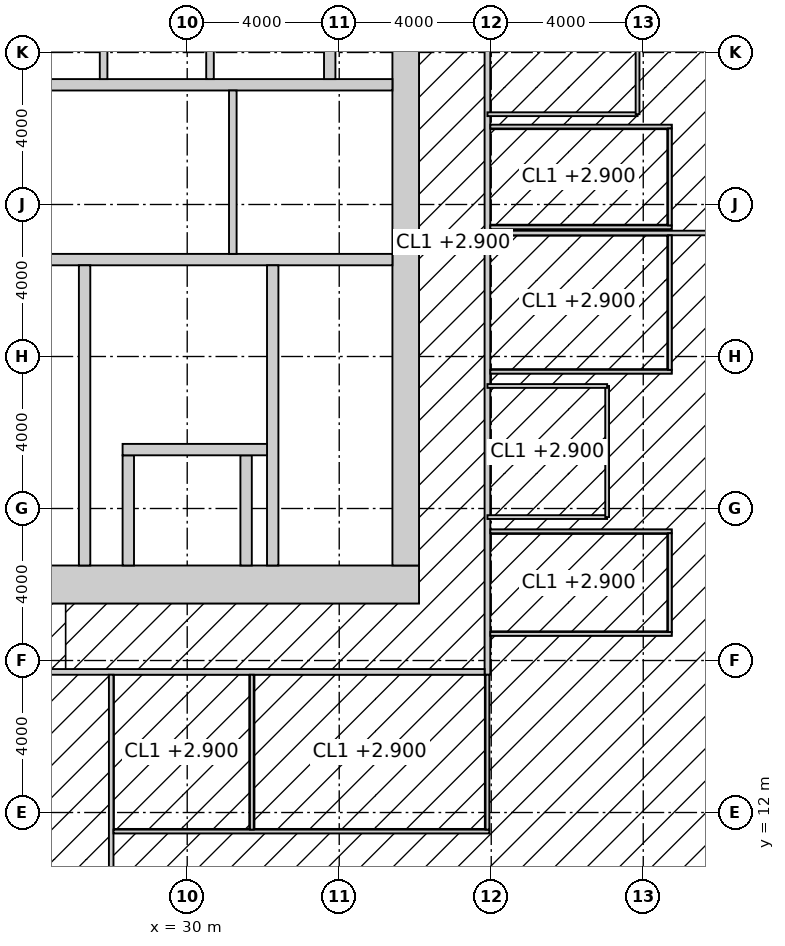
"""IFC4 building model, lengths in metres.
Left out: names, types, materials, properties, quantities, classifications, styles, units other than length and angle.
Written with IfcOpenShell. Run it as: python <this file> out.ifc"""

import sys

from ifc_helpers import new_model, si_unit, direction, frame, frame_2d, origin, place, context, subcontext, project, spatial, rectangle, extrude, element, fill, save


model = new_model("IFC4")
c1 = context("Model", 3, precision=1e-05, world=origin(), true_north=direction((0.0, 1.0)))
c2 = subcontext(c1, "Body", "Model", "MODEL_VIEW")
j1 = project(units=[si_unit("LENGTHUNIT", "METRE"), si_unit("PLANEANGLEUNIT", "RADIAN")], contexts=[c1])
p1 = place(None, origin())
s1 = spatial("IfcSite", under=j1, at=p1, CompositionType="ELEMENT")
p2 = place(p1, origin())
s2 = spatial("IfcBuilding", under=s1, at=p2, CompositionType="ELEMENT")
p3 = place(p2, frame((0.0, 0.0, 121.4)))
s3 = spatial("IfcBuildingStorey", under=s2, at=p3, CompositionType="ELEMENT", Elevation=121.4)
p4 = place(p3, frame((18.5, 18.0, -0.15), z_axis=(0.0, 0.0, 1.0), x_axis=(1.0, 0.0, 0.0)))
e1 = element("IfcWall", 1, at=p4, inside=s3, PredefinedType="SHEAR", context=c2, shape_type="SweptSolid", body=[
    extrude(rectangle(XDim=17.6, YDim=1.0, at=frame_2d((8.8, 0.0))), origin(), (0.0, 0.0, 1.0), 4.0),
])
p5 = place(p4, frame((3.45, 0.0, 0.15)))
e2 = element("IfcOpeningElement", 2, at=p5, cuts=e1, PredefinedType="OPENING", context=c2, shape_type="SweptSolid", body=[
    extrude(rectangle(XDim=1.5, YDim=2.4, at=frame_2d((0.75, 1.2))), frame((0.0, 0.51, 0.0), z_axis=(0.0, -1.0, 0.0), x_axis=(1.0, 0.0, 0.0)), (0.0, 0.0, 1.0), 1.02),
])
p6 = place(p3, frame((35.75, 18.5, -0.15), z_axis=(0.0, 0.0, 1.0), x_axis=(0.0, 1.0, 0.0)))
e3 = element("IfcWall", 3, at=p6, inside=s3, PredefinedType="SHEAR", context=c2, shape_type="SweptSolid", body=[
    extrude(rectangle(XDim=17.0, YDim=0.7, at=frame_2d((8.5, 0.0))), origin(), (0.0, 0.0, 1.0), 4.0),
])
p7 = place(p6, frame((9.85, 0.0, 0.15)))
e4 = element("IfcOpeningElement", 4, at=p7, cuts=e3, PredefinedType="OPENING", context=c2, shape_type="SweptSolid", body=[
    extrude(rectangle(XDim=1.0, YDim=2.2, at=frame_2d((0.5, 1.1))), frame((0.0, 0.36, 0.0), z_axis=(0.0, -1.0, 0.0), x_axis=(1.0, 0.0, 0.0)), (0.0, 0.0, 1.0), 0.72),
])
p8 = place(p3, frame((24.15, 26.55, -0.15), z_axis=(0.0, 0.0, 1.0), x_axis=(1.0, 0.0, 0.0)))
e5 = element("IfcWall", 5, at=p8, inside=s3, PredefinedType="SHEAR", context=c2, shape_type="SweptSolid", body=[
    extrude(rectangle(XDim=11.25, YDim=0.3, at=frame_2d((5.625, 0.0))), origin(), (0.0, 0.0, 1.0), 4.0),
])
p9 = place(p8, frame((9.25, 0.0, 0.15)))
e6 = element("IfcOpeningElement", 6, at=p9, cuts=e5, PredefinedType="OPENING", context=c2, shape_type="SweptSolid", body=[
    extrude(rectangle(XDim=1.0, YDim=2.2, at=frame_2d((0.5, 1.1))), frame((0.0, 0.16, 0.0), z_axis=(0.0, -1.0, 0.0), x_axis=(1.0, 0.0, 0.0)), (0.0, 0.0, 1.0), 0.32),
])
p10 = place(p8, frame((4.9, 0.0, 0.15)))
e7 = element("IfcOpeningElement", 7, at=p10, cuts=e5, PredefinedType="OPENING", context=c2, shape_type="SweptSolid", body=[
    extrude(rectangle(XDim=1.5, YDim=2.4, at=frame_2d((0.75, 1.2))), frame((0.0, 0.16, 0.0), z_axis=(0.0, -1.0, 0.0), x_axis=(1.0, 0.0, 0.0)), (0.0, 0.0, 1.0), 0.32),
])
p11 = place(p3, frame((27.3, 18.5, -0.15), z_axis=(0.0, 0.0, 1.0), x_axis=(0.0, 1.0, 0.0)))
e8 = element("IfcWall", 8, at=p11, inside=s3, PredefinedType="SHEAR", context=c2, shape_type="SweptSolid", body=[
    extrude(rectangle(XDim=7.9, YDim=0.3, at=frame_2d((3.95, 0.0))), origin(), (0.0, 0.0, 1.0), 4.0),
])
p12 = place(p11, frame((6.4, 0.0, 0.15)))
e9 = element("IfcOpeningElement", 9, at=p12, cuts=e8, PredefinedType="OPENING", context=c2, shape_type="SweptSolid", body=[
    extrude(rectangle(XDim=1.0, YDim=2.2, at=frame_2d((0.5, 1.1))), frame((0.0, 0.16, 0.0), z_axis=(0.0, -1.0, 0.0), x_axis=(1.0, 0.0, 0.0)), (0.0, 0.0, 1.0), 0.32),
])
p13 = place(p3, frame((32.25, 18.5, -0.15), z_axis=(0.0, 0.0, 1.0), x_axis=(0.0, 1.0, 0.0)))
e10 = element("IfcWall", 10, at=p13, inside=s3, PredefinedType="SHEAR", context=c2, shape_type="SweptSolid", body=[
    extrude(rectangle(XDim=7.9, YDim=0.3, at=frame_2d((3.95, 0.0))), origin(), (0.0, 0.0, 1.0), 4.0),
])
for number, where, z_axis, x_axis in (
    (11, (28.45, 18.5, -0.15), (0.0, 0.0, 1.0), (0.0, 1.0, 0.0)),
    (12, (31.55, 18.5, -0.15), (0.0, 0.0, 1.0), (0.0, 1.0, 0.0)),
):
    element("IfcWall", number, at=place(p3, frame(where, z_axis=z_axis, x_axis=x_axis)), inside=s3, PredefinedType="SHEAR", context=c2, shape_type="SweptSolid", body=[
        extrude(rectangle(XDim=2.9, YDim=0.3, at=frame_2d((1.45, 0.0))), origin(), (0.0, 0.0, 1.0), 4.0),
    ])
p14 = place(p3, frame((28.3, 21.55, -0.15), z_axis=(0.0, 0.0, 1.0), x_axis=(1.0, 0.0, 0.0)))
e13 = element("IfcWall", 13, at=p14, inside=s3, PredefinedType="SHEAR", context=c2, shape_type="SweptSolid", body=[
    extrude(rectangle(XDim=3.8, YDim=0.3, at=frame_2d((1.9, 0.0))), origin(), (0.0, 0.0, 1.0), 4.0),
])
p15 = place(p14, frame((1.05, 0.0, 0.15)))
e14 = element("IfcOpeningElement", 14, at=p15, cuts=e13, PredefinedType="OPENING", context=c2, shape_type="SweptSolid", body=[
    extrude(rectangle(XDim=1.3, YDim=2.4, at=frame_2d((0.65, 1.2))), frame((0.0, 0.16, 0.0), z_axis=(0.0, -1.0, 0.0), x_axis=(1.0, 0.0, 0.0)), (0.0, 0.0, 1.0), 0.32),
])
p16 = place(p3, frame((24.15, 31.15, -0.15), z_axis=(0.0, 0.0, 1.0), x_axis=(1.0, 0.0, 0.0)))
e15 = element("IfcWall", 15, at=p16, inside=s3, PredefinedType="SHEAR", context=c2, shape_type="SweptSolid", body=[
    extrude(rectangle(XDim=11.25, YDim=0.3, at=frame_2d((5.625, 0.0))), origin(), (0.0, 0.0, 1.0), 4.0),
])
p17 = place(p16, frame((7.25, 0.0, 0.15)))
e16 = element("IfcOpeningElement", 16, at=p17, cuts=e15, PredefinedType="OPENING", context=c2, shape_type="SweptSolid", body=[
    extrude(rectangle(XDim=1.4, YDim=2.4, at=frame_2d((0.7, 1.2))), frame((0.0, 0.16, 0.0), z_axis=(0.0, -1.0, 0.0), x_axis=(1.0, 0.0, 0.0)), (0.0, 0.0, 1.0), 0.32),
])
p18 = place(p3, frame((33.75, 31.3, -0.15), z_axis=(0.0, 0.0, 1.0), x_axis=(0.0, 1.0, 0.0)))
e17 = element("IfcWall", 17, at=p18, inside=s3, PredefinedType="SHEAR", context=c2, shape_type="SweptSolid", body=[
    extrude(rectangle(XDim=4.2, YDim=0.3, at=frame_2d((2.1, 0.0))), origin(), (0.0, 0.0, 1.0), 4.0),
])
for number, where, z_axis, x_axis in (
    (18, (27.8, 31.3, -0.15), (0.0, 0.0, 1.0), (0.0, 1.0, 0.0)),
    (19, (30.6, 31.3, -0.15), (0.0, 0.0, 1.0), (0.0, 1.0, 0.0)),
):
    element("IfcWall", number, at=place(p3, frame(where, z_axis=z_axis, x_axis=x_axis)), inside=s3, PredefinedType="SOLIDWALL", context=c2, shape_type="SweptSolid", body=[
        extrude(rectangle(XDim=2.8, YDim=0.2, at=frame_2d((1.4, 0.0))), origin(), (0.0, 0.0, 1.0), 4.0),
    ])
p19 = place(p3, frame((31.2, 26.7, 0.0), z_axis=(0.0, 0.0, 1.0), x_axis=(0.0, 1.0, 0.0)))
e20 = element("IfcWall", 20, at=p19, inside=s3, PredefinedType="SOLIDWALL", context=c2, shape_type="SweptSolid", body=[
    extrude(rectangle(XDim=4.3, YDim=0.2, at=frame_2d((2.15, 0.0))), origin(), (0.0, 0.0, 1.0), 3.85),
])
p20 = place(p3, frame((37.9, 15.625, 0.0), z_axis=(0.0, 0.0, 1.0), x_axis=(0.0, 1.0, 0.0)))
e21 = element("IfcWall", 21, at=p20, inside=s3, PredefinedType="PARTITIONING", context=c2, shape_type="SweptSolid", body=[
    extrude(rectangle(XDim=22.75, YDim=0.15, at=frame_2d((11.375, 0.0))), origin(), (0.0, 0.0, 1.0), 2.95),
])
p21 = place(p20, frame((4.974, 0.0, 0.0)))
e22 = element("IfcOpeningElement", 22, at=p21, cuts=e21, PredefinedType="OPENING", context=c2, shape_type="SweptSolid", body=[
    extrude(rectangle(XDim=1.8, YDim=2.4, at=frame_2d((0.9, 1.2))), frame((0.0, 0.085, 0.0), z_axis=(0.0, -1.0, 0.0), x_axis=(1.0, 0.0, 0.0)), (0.0, 0.0, 1.0), 0.17),
])
p22 = place(p20, frame((16.226, 0.0, 0.0)))
e23 = element("IfcOpeningElement", 23, at=p22, cuts=e21, PredefinedType="OPENING", context=c2, shape_type="SweptSolid", body=[
    extrude(rectangle(XDim=1.8, YDim=2.4, at=frame_2d((0.9, 1.2))), frame((0.0, 0.085, 0.0), z_axis=(0.0, -1.0, 0.0), x_axis=(1.0, 0.0, 0.0)), (0.0, 0.0, 1.0), 0.17),
])
p23 = place(p3, frame((15.775, 15.7, 0.0), z_axis=(0.0, 0.0, 1.0), x_axis=(1.0, 0.0, 0.0)))
e24 = element("IfcWall", 24, at=p23, inside=s3, PredefinedType="PARTITIONING", context=c2, shape_type="SweptSolid", body=[
    extrude(rectangle(XDim=22.05, YDim=0.15, at=frame_2d((11.025, 0.0))), origin(), (0.0, 0.0, 1.0), 3.85),
])
p24 = place(p3, frame((28.0, 4.3, 0.0), z_axis=(0.0, 0.0, 1.0), x_axis=(0.0, 1.0, 0.0)))
e25 = element("IfcWall", 25, at=p24, inside=s3, PredefinedType="PARTITIONING", context=c2, shape_type="SweptSolid", body=[
    extrude(rectangle(XDim=11.325, YDim=0.12, at=frame_2d((5.663, 0.0))), origin(), (0.0, 0.0, 1.0), 3.85),
])
p25 = place(p3, frame((37.975, 27.25, 0.0), z_axis=(0.0, 0.0, 1.0), x_axis=(1.0, 0.0, 0.0)))
e26 = element("IfcWall", 26, at=p25, inside=s3, PredefinedType="PARTITIONING", context=c2, shape_type="SweptSolid", body=[
    extrude(rectangle(XDim=19.725, YDim=0.12, at=frame_2d((9.862, 0.0))), origin(), (0.0, 0.0, 1.0), 3.85),
])
p26 = place(p3, frame((28.061, 11.5, 0.0), z_axis=(0.0, 0.0, 1.0), x_axis=(1.0, 0.0, 0.0)))
e27 = element("IfcWall", 27, at=p26, inside=s3, PredefinedType="PARTITIONING", context=c2, shape_type="SweptSolid", body=[
    extrude(rectangle(XDim=9.889, YDim=0.1, at=frame_2d((4.944, 0.0))), origin(), (0.0, 0.0, 1.0), 3.85),
])
p27 = place(p26, frame((1.29, 0.0, 0.0)))
e28 = element("IfcOpeningElement", 28, at=p27, cuts=e27, PredefinedType="OPENING", context=c2, shape_type="SweptSolid", body=[
    extrude(rectangle(XDim=1.0, YDim=2.2, at=frame_2d((0.5, 1.1))), frame((0.0, 0.06, 0.0), z_axis=(0.0, -1.0, 0.0), x_axis=(1.0, 0.0, 0.0)), (0.0, 0.0, 1.0), 0.12),
])
p28 = place(p26, frame((6.24, 0.0, 0.0)))
e29 = element("IfcOpeningElement", 29, at=p28, cuts=e27, PredefinedType="OPENING", context=c2, shape_type="SweptSolid", body=[
    extrude(rectangle(XDim=1.0, YDim=2.2, at=frame_2d((0.5, 1.1))), frame((0.0, 0.06, 0.0), z_axis=(0.0, -1.0, 0.0), x_axis=(1.0, 0.0, 0.0)), (0.0, 0.0, 1.0), 0.12),
])
for number, where, z_axis, x_axis in (
    (30, (37.975, 16.7, 0.0), (0.0, 0.0, 1.0), (1.0, 0.0, 0.0)),
    (31, (37.975, 19.399, 0.0), (0.0, 0.0, 1.0), (1.0, 0.0, 0.0)),
):
    element("IfcWall", number, at=place(p3, frame(where, z_axis=z_axis, x_axis=x_axis)), inside=s3, PredefinedType="PARTITIONING", context=c2, shape_type="SweptSolid", body=[
        extrude(rectangle(XDim=4.775, YDim=0.1, at=frame_2d((2.387, 0.0))), origin(), (0.0, 0.0, 1.0), 3.85),
    ])
p29 = place(p3, frame((37.975, 23.599, 0.0), z_axis=(0.0, 0.0, 1.0), x_axis=(1.0, 0.0, 0.0)))
e32 = element("IfcWall", 32, at=p29, inside=s3, PredefinedType="PARTITIONING", context=c2, shape_type="SweptSolid", body=[
    extrude(rectangle(XDim=4.775, YDim=0.1, at=frame_2d((2.387, 0.0))), origin(), (0.0, 0.0, 1.0), 2.95),
])
for number, where, z_axis, x_axis in (
    (33, (37.975, 27.4, 0.0), (0.0, 0.0, 1.0), (1.0, 0.0, 0.0)),
    (34, (37.975, 30.05, 0.0), (0.0, 0.0, 1.0), (1.0, 0.0, 0.0)),
):
    element("IfcWall", number, at=place(p3, frame(where, z_axis=z_axis, x_axis=x_axis)), inside=s3, PredefinedType="PARTITIONING", context=c2, shape_type="SweptSolid", body=[
        extrude(rectangle(XDim=4.775, YDim=0.1, at=frame_2d((2.387, 0.0))), origin(), (0.0, 0.0, 1.0), 3.85),
    ])
p30 = place(p3, frame((31.701, 11.55, 0.0), z_axis=(0.0, 0.0, 1.0), x_axis=(0.0, 1.0, 0.0)))
e35 = element("IfcWall", 35, at=p30, inside=s3, PredefinedType="PARTITIONING", context=c2, shape_type="SweptSolid", body=[
    extrude(rectangle(XDim=4.075, YDim=0.1, at=frame_2d((2.038, 0.0))), origin(), (0.0, 0.0, 1.0), 3.85),
])
p31 = place(p3, frame((37.9, 11.55, 0.0), z_axis=(0.0, 0.0, 1.0), x_axis=(0.0, 1.0, 0.0)))
e36 = element("IfcWall", 36, at=p31, inside=s3, PredefinedType="PARTITIONING", context=c2, shape_type="SweptSolid", body=[
    extrude(rectangle(XDim=4.075, YDim=0.1, at=frame_2d((2.038, 0.0))), origin(), (0.0, 0.0, 1.0), 2.95),
])
p32 = place(p3, frame((42.7, 16.75, 0.0), z_axis=(0.0, 0.0, 1.0), x_axis=(0.0, 1.0, 0.0)))
e37 = element("IfcWall", 37, at=p32, inside=s3, PredefinedType="PARTITIONING", context=c2, shape_type="SweptSolid", body=[
    extrude(rectangle(XDim=2.599, YDim=0.1, at=frame_2d((1.3, 0.0))), origin(), (0.0, 0.0, 1.0), 3.85),
])
p33 = place(p32, frame((0.8, 0.0, 0.0)))
e38 = element("IfcOpeningElement", 38, at=p33, cuts=e37, PredefinedType="OPENING", context=c2, shape_type="SweptSolid", body=[
    extrude(rectangle(XDim=1.0, YDim=2.2, at=frame_2d((0.5, 1.1))), frame((0.0, 0.06, 0.0), z_axis=(0.0, -1.0, 0.0), x_axis=(1.0, 0.0, 0.0)), (0.0, 0.0, 1.0), 0.12),
])
p34 = place(p3, frame((42.7, 23.649, 0.0), z_axis=(0.0, 0.0, 1.0), x_axis=(0.0, 1.0, 0.0)))
e39 = element("IfcWall", 39, at=p34, inside=s3, PredefinedType="PARTITIONING", context=c2, shape_type="SweptSolid", body=[
    extrude(rectangle(XDim=3.54, YDim=0.1, at=frame_2d((1.77, 0.0))), origin(), (0.0, 0.0, 1.0), 3.85),
])
p35 = place(p34, frame((1.275, 0.0, 0.0)))
e40 = element("IfcOpeningElement", 40, at=p35, cuts=e39, PredefinedType="OPENING", context=c2, shape_type="SweptSolid", body=[
    extrude(rectangle(XDim=1.0, YDim=2.2, at=frame_2d((0.5, 1.1))), frame((0.0, 0.06, 0.0), z_axis=(0.0, -1.0, 0.0), x_axis=(1.0, 0.0, 0.0)), (0.0, 0.0, 1.0), 0.12),
])
p36 = place(p3, frame((42.7, 27.45, 0.0), z_axis=(0.0, 0.0, 1.0), x_axis=(0.0, 1.0, 0.0)))
e41 = element("IfcWall", 41, at=p36, inside=s3, PredefinedType="PARTITIONING", context=c2, shape_type="SweptSolid", body=[
    extrude(rectangle(XDim=2.55, YDim=0.1, at=frame_2d((1.275, 0.0))), origin(), (0.0, 0.0, 1.0), 3.85),
])
p37 = place(p36, frame((0.775, 0.0, 0.0)))
e42 = element("IfcOpeningElement", 42, at=p37, cuts=e41, PredefinedType="OPENING", context=c2, shape_type="SweptSolid", body=[
    extrude(rectangle(XDim=1.0, YDim=2.2, at=frame_2d((0.5, 1.1))), frame((0.0, 0.06, 0.0), z_axis=(0.0, -1.0, 0.0), x_axis=(1.0, 0.0, 0.0)), (0.0, 0.0, 1.0), 0.12),
])
p38 = place(p3, frame((37.9, 19.774, 0.0), z_axis=(0.0, 0.0, 1.0), x_axis=(1.0, 0.0, 0.0)))
e43 = element("IfcWall", 43, at=p38, inside=s3, PredefinedType="PARTITIONING", context=c2, shape_type="SweptSolid", body=[
    extrude(rectangle(XDim=3.15, YDim=0.1, at=frame_2d((1.575, 0.0))), origin(), (0.0, 0.0, 1.0), 2.95),
])
p39 = place(p3, frame((41.05, 19.774, 0.0), z_axis=(0.0, 0.0, 1.0), x_axis=(0.0, 1.0, 0.0)))
e44 = element("IfcWall", 44, at=p39, inside=s3, PredefinedType="PARTITIONING", context=c2, shape_type="SweptSolid", body=[
    extrude(rectangle(XDim=3.45, YDim=0.1, at=frame_2d((1.725, 0.0))), origin(), (0.0, 0.0, 1.0), 3.85),
])
p40 = place(p39, frame((1.225, 0.0, 0.0)))
e45 = element("IfcOpeningElement", 45, at=p40, cuts=e44, PredefinedType="OPENING", context=c2, shape_type="SweptSolid", body=[
    extrude(rectangle(XDim=1.0, YDim=2.2, at=frame_2d((0.5, 1.1))), frame((0.0, 0.06, 0.0), z_axis=(0.0, -1.0, 0.0), x_axis=(1.0, 0.0, 0.0)), (0.0, 0.0, 1.0), 0.12),
])
p41 = place(p3, frame((41.05, 23.224, 0.0), z_axis=(0.0, 0.0, 1.0), x_axis=(-1.0, 0.0, 0.0)))
e46 = element("IfcWall", 46, at=p41, inside=s3, PredefinedType="PARTITIONING", context=c2, shape_type="SweptSolid", body=[
    extrude(rectangle(XDim=3.15, YDim=0.1, at=frame_2d((1.575, 0.0))), origin(), (0.0, 0.0, 1.0), 3.85),
])
p42 = place(p3, frame((37.9, 30.376, 0.0), z_axis=(0.0, 0.0, 1.0), x_axis=(1.0, 0.0, 0.0)))
e47 = element("IfcWall", 47, at=p42, inside=s3, PredefinedType="PARTITIONING", context=c2, shape_type="SweptSolid", body=[
    extrude(rectangle(XDim=3.95, YDim=0.1, at=frame_2d((1.975, 0.0))), origin(), (0.0, 0.0, 1.0), 3.85),
])
p43 = place(p3, frame((41.85, 30.376, 0.0), z_axis=(0.0, 0.0, 1.0), x_axis=(0.0, 1.0, 0.0)))
e48 = element("IfcWall", 48, at=p43, inside=s3, PredefinedType="PARTITIONING", context=c2, shape_type="SweptSolid", body=[
    extrude(rectangle(XDim=4.15, YDim=0.1, at=frame_2d((2.075, 0.0))), origin(), (0.0, 0.0, 1.0), 3.85),
])
p44 = place(p43, frame((1.575, 0.0, 0.0)))
e49 = element("IfcOpeningElement", 49, at=p44, cuts=e48, PredefinedType="OPENING", context=c2, shape_type="SweptSolid", body=[
    extrude(rectangle(XDim=1.0, YDim=2.2, at=frame_2d((0.5, 1.1))), frame((0.0, 0.06, 0.0), z_axis=(0.0, -1.0, 0.0), x_axis=(1.0, 0.0, 0.0)), (0.0, 0.0, 1.0), 0.12),
])
p45 = place(p12, origin())
e50 = element("IfcDoor", 50, at=p45, inside=s3, OperationType="SINGLE_SWING_RIGHT", PredefinedType="DOOR", context=c2, shape_type="SweptSolid", body=[
    extrude(rectangle(XDim=1.0, YDim=2.2, at=frame_2d((0.5, 1.1))), frame((0.0, 0.025, 0.0), z_axis=(0.0, -1.0, 0.0), x_axis=(1.0, 0.0, 0.0)), (0.0, 0.0, 1.0), 0.05),
])
fill(e9, e50)
p46 = place(p9, frame((1.0, 0.0, 0.0), z_axis=(0.0, 0.0, 1.0), x_axis=(-1.0, 0.0, 0.0)))
e51 = element("IfcDoor", 51, at=p46, inside=s3, OperationType="SINGLE_SWING_RIGHT", PredefinedType="DOOR", context=c2, shape_type="SweptSolid", body=[
    extrude(rectangle(XDim=1.0, YDim=2.2, at=frame_2d((0.5, 1.1))), frame((0.0, 0.025, 0.0), z_axis=(0.0, -1.0, 0.0), x_axis=(1.0, 0.0, 0.0)), (0.0, 0.0, 1.0), 0.05),
])
fill(e6, e51)
p47 = place(p7, origin())
e52 = element("IfcDoor", 52, at=p47, inside=s3, OperationType="SINGLE_SWING_RIGHT", PredefinedType="DOOR", context=c2, shape_type="SweptSolid", body=[
    extrude(rectangle(XDim=1.0, YDim=2.2, at=frame_2d((0.5, 1.1))), frame((0.0, 0.025, 0.0), z_axis=(0.0, -1.0, 0.0), x_axis=(1.0, 0.0, 0.0)), (0.0, 0.0, 1.0), 0.05),
])
fill(e4, e52)
p48 = place(p10, origin())
e53 = element("IfcDoor", 53, at=p48, inside=s3, OperationType="DOUBLE_DOOR_DOUBLE_SWING", PredefinedType="DOOR", context=c2, shape_type="SweptSolid", body=[
    extrude(rectangle(XDim=1.5, YDim=2.4, at=frame_2d((0.75, 1.2))), frame((0.0, 0.025, 0.0), z_axis=(0.0, -1.0, 0.0), x_axis=(1.0, 0.0, 0.0)), (0.0, 0.0, 1.0), 0.05),
])
fill(e7, e53)
p49 = place(p21, origin())
e54 = element("IfcDoor", 54, at=p49, inside=s3, OperationType="DOUBLE_DOOR_DOUBLE_SWING", PredefinedType="DOOR", context=c2, shape_type="SweptSolid", body=[
    extrude(rectangle(XDim=1.8, YDim=2.4, at=frame_2d((0.9, 1.2))), frame((0.0, 0.025, 0.0), z_axis=(0.0, -1.0, 0.0), x_axis=(1.0, 0.0, 0.0)), (0.0, 0.0, 1.0), 0.05),
])
fill(e22, e54)
p50 = place(p22, origin())
e55 = element("IfcDoor", 55, at=p50, inside=s3, OperationType="DOUBLE_DOOR_DOUBLE_SWING", PredefinedType="DOOR", context=c2, shape_type="SweptSolid", body=[
    extrude(rectangle(XDim=1.8, YDim=2.4, at=frame_2d((0.9, 1.2))), frame((0.0, 0.025, 0.0), z_axis=(0.0, -1.0, 0.0), x_axis=(1.0, 0.0, 0.0)), (0.0, 0.0, 1.0), 0.05),
])
fill(e23, e55)
p51 = place(p27, origin())
e56 = element("IfcDoor", 56, at=p51, inside=s3, OperationType="SINGLE_SWING_RIGHT", PredefinedType="DOOR", context=c2, shape_type="SweptSolid", body=[
    extrude(rectangle(XDim=1.0, YDim=2.2, at=frame_2d((0.5, 1.1))), frame((0.0, 0.025, 0.0), z_axis=(0.0, -1.0, 0.0), x_axis=(1.0, 0.0, 0.0)), (0.0, 0.0, 1.0), 0.05),
])
fill(e28, e56)
p52 = place(p28, origin())
e57 = element("IfcDoor", 57, at=p52, inside=s3, OperationType="SINGLE_SWING_LEFT", PredefinedType="DOOR", context=c2, shape_type="SweptSolid", body=[
    extrude(rectangle(XDim=1.0, YDim=2.2, at=frame_2d((0.5, 1.1))), frame((0.0, 0.025, 0.0), z_axis=(0.0, -1.0, 0.0), x_axis=(1.0, 0.0, 0.0)), (0.0, 0.0, 1.0), 0.05),
])
fill(e29, e57)
p53 = place(p33, origin())
e58 = element("IfcDoor", 58, at=p53, inside=s3, OperationType="SINGLE_SWING_LEFT", PredefinedType="DOOR", context=c2, shape_type="SweptSolid", body=[
    extrude(rectangle(XDim=1.0, YDim=2.2, at=frame_2d((0.5, 1.1))), frame((0.0, 0.025, 0.0), z_axis=(0.0, -1.0, 0.0), x_axis=(1.0, 0.0, 0.0)), (0.0, 0.0, 1.0), 0.05),
])
fill(e38, e58)
p54 = place(p35, origin())
e59 = element("IfcDoor", 59, at=p54, inside=s3, OperationType="SINGLE_SWING_LEFT", PredefinedType="DOOR", context=c2, shape_type="SweptSolid", body=[
    extrude(rectangle(XDim=1.0, YDim=2.2, at=frame_2d((0.5, 1.1))), frame((0.0, 0.025, 0.0), z_axis=(0.0, -1.0, 0.0), x_axis=(1.0, 0.0, 0.0)), (0.0, 0.0, 1.0), 0.05),
])
fill(e40, e59)
p55 = place(p37, origin())
e60 = element("IfcDoor", 60, at=p55, inside=s3, OperationType="SINGLE_SWING_LEFT", PredefinedType="DOOR", context=c2, shape_type="SweptSolid", body=[
    extrude(rectangle(XDim=1.0, YDim=2.2, at=frame_2d((0.5, 1.1))), frame((0.0, 0.025, 0.0), z_axis=(0.0, -1.0, 0.0), x_axis=(1.0, 0.0, 0.0)), (0.0, 0.0, 1.0), 0.05),
])
fill(e42, e60)
p56 = place(p40, origin())
e61 = element("IfcDoor", 61, at=p56, inside=s3, OperationType="SINGLE_SWING_RIGHT", PredefinedType="DOOR", context=c2, shape_type="SweptSolid", body=[
    extrude(rectangle(XDim=1.0, YDim=2.2, at=frame_2d((0.5, 1.1))), frame((0.0, 0.025, 0.0), z_axis=(0.0, -1.0, 0.0), x_axis=(1.0, 0.0, 0.0)), (0.0, 0.0, 1.0), 0.05),
])
fill(e45, e61)
p57 = place(p44, origin())
e62 = element("IfcDoor", 62, at=p57, inside=s3, OperationType="SINGLE_SWING_RIGHT", PredefinedType="DOOR", context=c2, shape_type="SweptSolid", body=[
    extrude(rectangle(XDim=1.0, YDim=2.2, at=frame_2d((0.5, 1.1))), frame((0.0, 0.025, 0.0), z_axis=(0.0, -1.0, 0.0), x_axis=(1.0, 0.0, 0.0)), (0.0, 0.0, 1.0), 0.05),
])
fill(e49, e62)
p58 = place(p15, origin())
e63 = element("IfcDoor", 63, at=p58, inside=s3, OperationType="DOUBLE_DOOR_SLIDING", PredefinedType="DOOR", context=c2, shape_type="SweptSolid", body=[
    extrude(rectangle(XDim=1.3, YDim=2.4, at=frame_2d((0.65, 1.2))), frame((0.0, 0.025, 0.0), z_axis=(0.0, -1.0, 0.0), x_axis=(1.0, 0.0, 0.0)), (0.0, 0.0, 1.0), 0.05),
])
fill(e14, e63)
p59 = place(p17, origin())
e64 = element("IfcDoor", 64, at=p59, inside=s3, OperationType="DOUBLE_DOOR_SLIDING", PredefinedType="DOOR", context=c2, shape_type="SweptSolid", body=[
    extrude(rectangle(XDim=1.4, YDim=2.4, at=frame_2d((0.7, 1.2))), frame((0.0, 0.025, 0.0), z_axis=(0.0, -1.0, 0.0), x_axis=(1.0, 0.0, 0.0)), (0.0, 0.0, 1.0), 0.05),
])
fill(e16, e64)
save(model, sys.argv[1])
